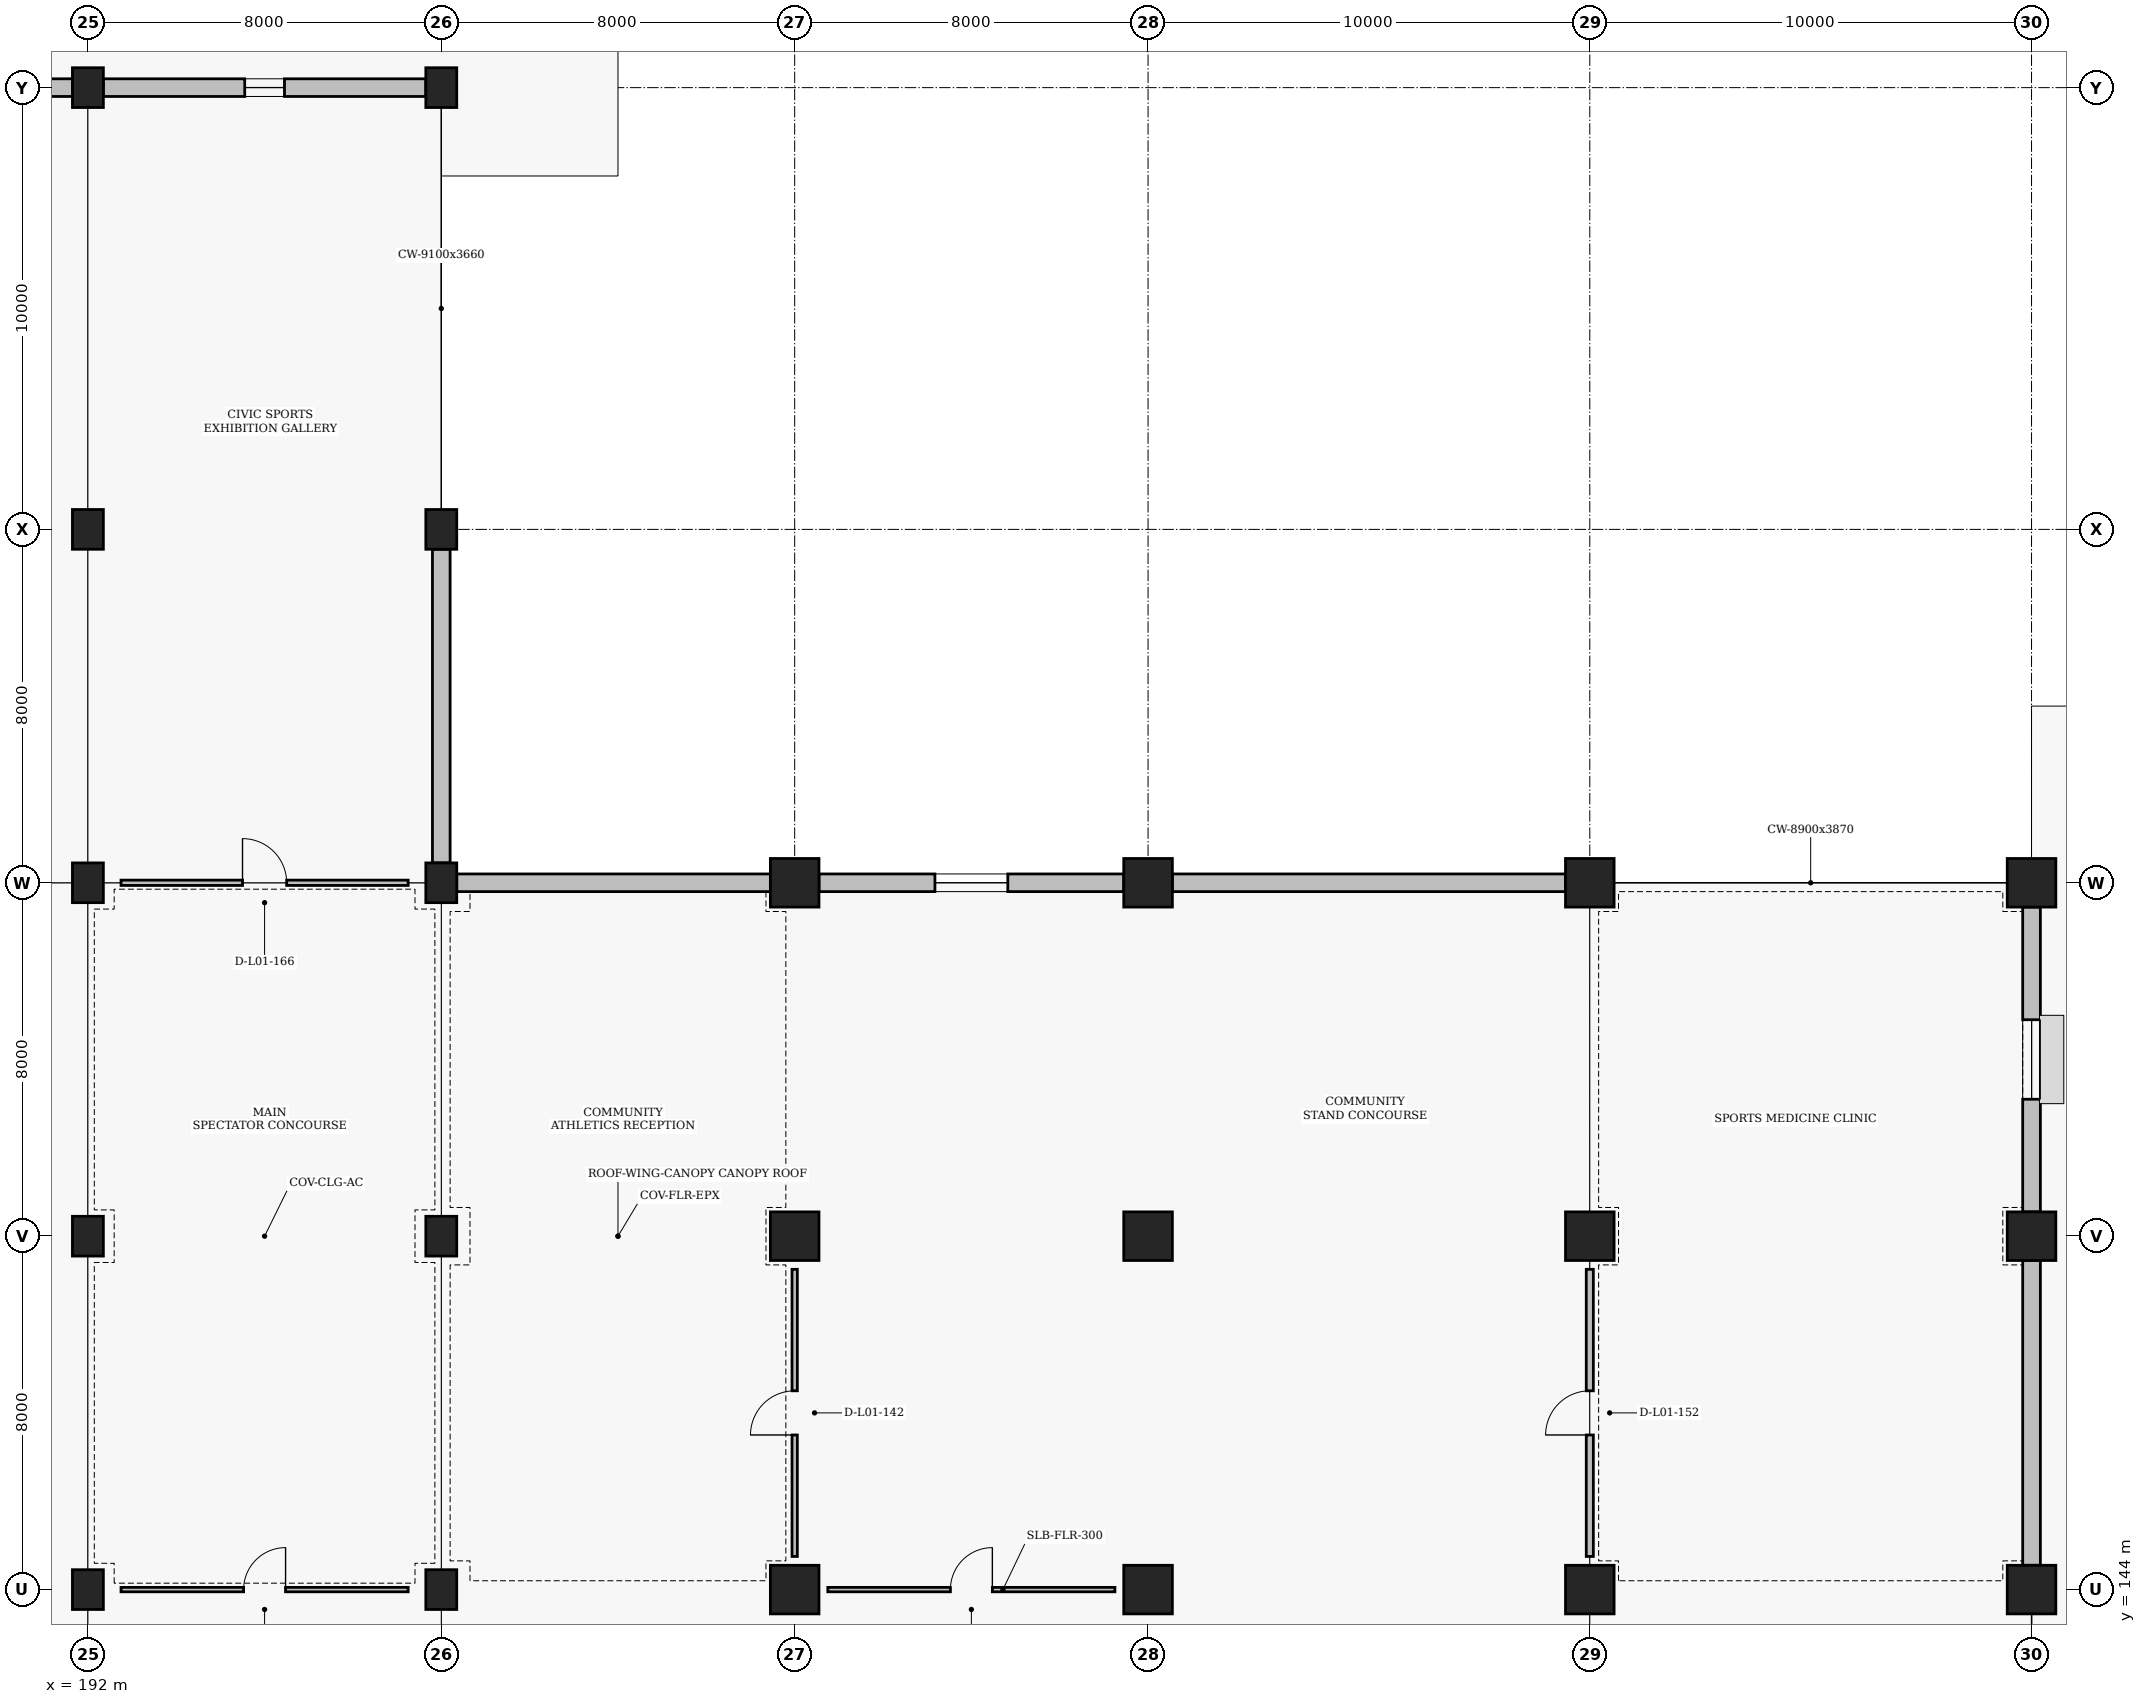
"""IFC4 building model, lengths in metres.
Left out: names, types, materials, properties, quantities, classifications, styles, units other than length and angle.
Written with IfcOpenShell. Run it as: python <this file> out.ifc"""

import sys

from ifc_helpers import new_model, si_unit, direction, frame, frame_2d, origin, origin_2d, place, context, subcontext, project, spatial, rectangle, extrude, element, fill, save


model = new_model("IFC4")
c1 = context("Model", 3, precision=1e-05, world=origin(), true_north=direction((0.0, 1.0)))
c2 = subcontext(c1, "Body", "Model", "MODEL_VIEW")
j1 = project(units=[si_unit("LENGTHUNIT", "METRE"), si_unit("PLANEANGLEUNIT", "RADIAN")], contexts=[c1])
p1 = place(None, origin())
s1 = spatial("IfcSite", under=j1, at=p1, CompositionType="ELEMENT")
p2 = place(p1, origin())
s2 = spatial("IfcBuilding", under=s1, at=p2, CompositionType="ELEMENT")
p3 = place(p2, origin())
s3 = spatial("IfcBuildingStorey", under=s2, at=p3, CompositionType="ELEMENT", Elevation=0.0)
for number, where, z_axis, x_axis in (
    (1, (192.0, 144.0, 0.0), (0.0, 0.0, 1.0), (1.0, 0.0, 0.0)),
    (2, (192.0, 152.0, 0.0), (0.0, 0.0, 1.0), (1.0, 0.0, 0.0)),
    (3, (192.0, 160.0, 0.0), (0.0, 0.0, 1.0), (1.0, 0.0, 0.0)),
    (4, (192.0, 168.0, 0.0), (0.0, 0.0, 1.0), (1.0, 0.0, 0.0)),
    (5, (192.0, 178.0, 0.0), (0.0, 0.0, 1.0), (1.0, 0.0, 0.0)),
    (6, (200.0, 144.0, 0.0), (0.0, 0.0, 1.0), (1.0, 0.0, 0.0)),
    (7, (200.0, 152.0, 0.0), (0.0, 0.0, 1.0), (1.0, 0.0, 0.0)),
    (8, (200.0, 160.0, 0.0), (0.0, 0.0, 1.0), (1.0, 0.0, 0.0)),
    (9, (200.0, 168.0, 0.0), (0.0, 0.0, 1.0), (1.0, 0.0, 0.0)),
    (10, (200.0, 178.0, 0.0), (0.0, 0.0, 1.0), (1.0, 0.0, 0.0)),
):
    element("IfcColumn", number, at=place(p3, frame(where, z_axis=z_axis, x_axis=x_axis)), inside=s3, PredefinedType="COLUMN", context=c2, shape_type="SweptSolid", body=[
        extrude(rectangle(XDim=0.7, YDim=0.9, at=origin_2d()), origin(), (0.0, 0.0, 1.0), 4.8),
    ])
for number, where, z_axis, x_axis in (
    (11, (208.0, 144.0, 0.0), (0.0, 0.0, 1.0), (1.0, 0.0, 0.0)),
    (12, (208.0, 152.0, 0.0), (0.0, 0.0, 1.0), (1.0, 0.0, 0.0)),
    (13, (208.0, 160.0, 0.0), (0.0, 0.0, 1.0), (1.0, 0.0, 0.0)),
    (14, (216.0, 144.0, 0.0), (0.0, 0.0, 1.0), (1.0, 0.0, 0.0)),
    (15, (216.0, 152.0, 0.0), (0.0, 0.0, 1.0), (1.0, 0.0, 0.0)),
    (16, (216.0, 160.0, 0.0), (0.0, 0.0, 1.0), (1.0, 0.0, 0.0)),
    (17, (226.0, 144.0, 0.0), (0.0, 0.0, 1.0), (1.0, 0.0, 0.0)),
    (18, (226.0, 152.0, 0.0), (0.0, 0.0, 1.0), (1.0, 0.0, 0.0)),
    (19, (226.0, 160.0, 0.0), (0.0, 0.0, 1.0), (1.0, 0.0, 0.0)),
    (20, (236.0, 144.0, 0.0), (0.0, 0.0, 1.0), (1.0, 0.0, 0.0)),
    (21, (236.0, 152.0, 0.0), (0.0, 0.0, 1.0), (1.0, 0.0, 0.0)),
    (22, (236.0, 160.0, 0.0), (0.0, 0.0, 1.0), (1.0, 0.0, 0.0)),
):
    element("IfcColumn", number, at=place(p3, frame(where, z_axis=z_axis, x_axis=x_axis)), inside=s3, PredefinedType="COLUMN", context=c2, shape_type="SweptSolid", body=[
        extrude(rectangle(XDim=1.1, YDim=1.1, at=origin_2d()), origin(), (0.0, 0.0, 1.0), 4.8),
    ])
p4 = place(p3, frame((184.35, 178.0, 0.0), z_axis=(0.0, 0.0, 1.0), x_axis=(1.0, 0.0, 0.0)))
e23 = element("IfcWall", 23, at=p4, inside=s3, PredefinedType="SOLIDWALL", context=c2, shape_type="SweptSolid", body=[
    extrude(rectangle(XDim=7.3, YDim=0.4, at=frame_2d((3.65, 0.0))), origin(), (0.0, 0.0, 1.0), 3.71),
])
p5 = place(p3, frame((200.0, 160.45, 0.0), z_axis=(0.0, 0.0, 1.0), x_axis=(0.0, 1.0, 0.0)))
e24 = element("IfcWall", 24, at=p5, inside=s3, PredefinedType="SOLIDWALL", context=c2, shape_type="SweptSolid", body=[
    extrude(rectangle(XDim=7.1, YDim=0.4, at=frame_2d((3.55, 0.0))), origin(), (0.0, 0.0, 1.0), 3.66),
])
p6 = place(p3, frame((192.35, 178.0, 0.0), z_axis=(0.0, 0.0, 1.0), x_axis=(1.0, 0.0, 0.0)))
e25 = element("IfcWall", 25, at=p6, inside=s3, PredefinedType="SOLIDWALL", context=c2, shape_type="SweptSolid", body=[
    extrude(rectangle(XDim=7.3, YDim=0.4, at=frame_2d((3.65, 0.0))), origin(), (0.0, 0.0, 1.0), 3.71),
])
p7 = place(p6, frame((3.2, 0.0, 0.95)))
e26 = element("IfcOpeningElement", 26, at=p7, cuts=e25, PredefinedType="OPENING", context=c2, shape_type="SweptSolid", body=[
    extrude(rectangle(XDim=0.9, YDim=1.5, at=frame_2d((0.45, 0.75))), frame((0.0, 0.21, 0.0), z_axis=(0.0, -1.0, 0.0), x_axis=(1.0, 0.0, 0.0)), (0.0, 0.0, 1.0), 0.42),
])
p8 = place(p3, frame((200.35, 160.0, 0.0), z_axis=(0.0, 0.0, 1.0), x_axis=(1.0, 0.0, 0.0)))
e27 = element("IfcWall", 27, at=p8, inside=s3, PredefinedType="SOLIDWALL", context=c2, shape_type="SweptSolid", body=[
    extrude(rectangle(XDim=7.1, YDim=0.4, at=frame_2d((3.55, 0.0))), origin(), (0.0, 0.0, 1.0), 3.81),
])
p9 = place(p3, frame((208.55, 160.0, 0.0), z_axis=(0.0, 0.0, 1.0), x_axis=(1.0, 0.0, 0.0)))
e28 = element("IfcWall", 28, at=p9, inside=s3, PredefinedType="SOLIDWALL", context=c2, shape_type="SweptSolid", body=[
    extrude(rectangle(XDim=6.9, YDim=0.4, at=frame_2d((3.45, 0.0))), origin(), (0.0, 0.0, 1.0), 3.87),
])
p10 = place(p9, frame((2.625, 0.0, 0.95)))
e29 = element("IfcOpeningElement", 29, at=p10, cuts=e28, PredefinedType="OPENING", context=c2, shape_type="SweptSolid", body=[
    extrude(rectangle(XDim=1.65, YDim=1.7, at=frame_2d((0.825, 0.85))), frame((0.0, 0.21, 0.0), z_axis=(0.0, -1.0, 0.0), x_axis=(1.0, 0.0, 0.0)), (0.0, 0.0, 1.0), 0.42),
])
p11 = place(p3, frame((216.55, 160.0, 0.0), z_axis=(0.0, 0.0, 1.0), x_axis=(1.0, 0.0, 0.0)))
e30 = element("IfcWall", 30, at=p11, inside=s3, PredefinedType="SOLIDWALL", context=c2, shape_type="SweptSolid", body=[
    extrude(rectangle(XDim=8.9, YDim=0.4, at=frame_2d((4.45, 0.0))), origin(), (0.0, 0.0, 1.0), 3.87),
])
p12 = place(p3, frame((236.0, 144.55, 0.0), z_axis=(0.0, 0.0, 1.0), x_axis=(0.0, 1.0, 0.0)))
e31 = element("IfcWall", 31, at=p12, inside=s3, PredefinedType="SOLIDWALL", context=c2, shape_type="SweptSolid", body=[
    extrude(rectangle(XDim=6.9, YDim=0.4, at=frame_2d((3.45, 0.0))), origin(), (0.0, 0.0, 1.0), 3.81),
])
p13 = place(p3, frame((236.0, 152.55, 0.0), z_axis=(0.0, 0.0, 1.0), x_axis=(0.0, 1.0, 0.0)))
e32 = element("IfcWall", 32, at=p13, inside=s3, PredefinedType="SOLIDWALL", context=c2, shape_type="SweptSolid", body=[
    extrude(rectangle(XDim=6.9, YDim=0.4, at=frame_2d((3.45, 0.0))), origin(), (0.0, 0.0, 1.0), 3.81),
])
p14 = place(p13, frame((2.55, 0.0, 0.95)))
e33 = element("IfcOpeningElement", 33, at=p14, cuts=e32, PredefinedType="OPENING", context=c2, shape_type="SweptSolid", body=[
    extrude(rectangle(XDim=1.8, YDim=1.8, at=frame_2d((0.9, 0.9))), frame((0.0, 0.21, 0.0), z_axis=(0.0, -1.0, 0.0), x_axis=(1.0, 0.0, 0.0)), (0.0, 0.0, 1.0), 0.42),
])
p15 = place(p3, frame((208.0, 144.75, 0.0), z_axis=(0.0, 0.0, 1.0), x_axis=(0.0, 1.0, 0.0)))
e34 = element("IfcWall", 34, at=p15, inside=s3, PredefinedType="PARTITIONING", context=c2, shape_type="SweptSolid", body=[
    extrude(rectangle(XDim=6.5, YDim=0.12, at=frame_2d((3.25, 0.0))), origin(), (0.0, 0.0, 1.0), 3.81),
])
p16 = place(p15, frame((2.75, 0.0, 0.0)))
e35 = element("IfcOpeningElement", 35, at=p16, cuts=e34, PredefinedType="OPENING", context=c2, shape_type="SweptSolid", body=[
    extrude(rectangle(XDim=1.0, YDim=2.1, at=frame_2d((0.5, 1.05))), frame((0.0, 0.07, 0.0), z_axis=(0.0, -1.0, 0.0), x_axis=(1.0, 0.0, 0.0)), (0.0, 0.0, 1.0), 0.14),
])
p17 = place(p3, frame((208.75, 144.0, 0.0), z_axis=(0.0, 0.0, 1.0), x_axis=(1.0, 0.0, 0.0)))
e36 = element("IfcWall", 36, at=p17, inside=s3, PredefinedType="PARTITIONING", context=c2, shape_type="SweptSolid", body=[
    extrude(rectangle(XDim=6.5, YDim=0.1, at=frame_2d((3.25, 0.0))), origin(), (0.0, 0.0, 1.0), 3.91),
])
p18 = place(p17, frame((2.775, 0.0, 0.0)))
e37 = element("IfcOpeningElement", 37, at=p18, cuts=e36, PredefinedType="OPENING", context=c2, shape_type="SweptSolid", body=[
    extrude(rectangle(XDim=0.95, YDim=2.1, at=frame_2d((0.475, 1.05))), frame((0.0, 0.06, 0.0), z_axis=(0.0, -1.0, 0.0), x_axis=(1.0, 0.0, 0.0)), (0.0, 0.0, 1.0), 0.12),
])
p19 = place(p3, frame((226.0, 144.75, 0.0), z_axis=(0.0, 0.0, 1.0), x_axis=(0.0, 1.0, 0.0)))
e38 = element("IfcWall", 38, at=p19, inside=s3, PredefinedType="PARTITIONING", context=c2, shape_type="SweptSolid", body=[
    extrude(rectangle(XDim=6.5, YDim=0.16, at=frame_2d((3.25, 0.0))), origin(), (0.0, 0.0, 1.0), 3.81),
])
p20 = place(p19, frame((2.75, 0.0, 0.0)))
e39 = element("IfcOpeningElement", 39, at=p20, cuts=e38, PredefinedType="OPENING", context=c2, shape_type="SweptSolid", body=[
    extrude(rectangle(XDim=1.0, YDim=2.1, at=frame_2d((0.5, 1.05))), frame((0.0, 0.09, 0.0), z_axis=(0.0, -1.0, 0.0), x_axis=(1.0, 0.0, 0.0)), (0.0, 0.0, 1.0), 0.18),
])
p21 = place(p3, frame((192.75, 144.0, 0.0), z_axis=(0.0, 0.0, 1.0), x_axis=(1.0, 0.0, 0.0)))
e40 = element("IfcWall", 40, at=p21, inside=s3, PredefinedType="PARTITIONING", context=c2, shape_type="SweptSolid", body=[
    extrude(rectangle(XDim=6.5, YDim=0.1, at=frame_2d((3.25, 0.0))), origin(), (0.0, 0.0, 1.0), 3.91),
])
p22 = place(p21, frame((2.775, 0.0, 0.0)))
e41 = element("IfcOpeningElement", 41, at=p22, cuts=e40, PredefinedType="OPENING", context=c2, shape_type="SweptSolid", body=[
    extrude(rectangle(XDim=0.95, YDim=2.1, at=frame_2d((0.475, 1.05))), frame((0.0, 0.06, 0.0), z_axis=(0.0, -1.0, 0.0), x_axis=(1.0, 0.0, 0.0)), (0.0, 0.0, 1.0), 0.12),
])
p23 = place(p3, frame((192.75, 160.0, 0.0), z_axis=(0.0, 0.0, 1.0), x_axis=(1.0, 0.0, 0.0)))
e42 = element("IfcWall", 42, at=p23, inside=s3, PredefinedType="PARTITIONING", context=c2, shape_type="SweptSolid", body=[
    extrude(rectangle(XDim=6.5, YDim=0.12, at=frame_2d((3.25, 0.0))), origin(), (0.0, 0.0, 1.0), 3.91),
])
p24 = place(p23, frame((2.75, 0.0, 0.0)))
e43 = element("IfcOpeningElement", 43, at=p24, cuts=e42, PredefinedType="OPENING", context=c2, shape_type="SweptSolid", body=[
    extrude(rectangle(XDim=1.0, YDim=2.1, at=frame_2d((0.5, 1.05))), frame((0.0, 0.07, 0.0), z_axis=(0.0, -1.0, 0.0), x_axis=(1.0, 0.0, 0.0)), (0.0, 0.0, 1.0), 0.14),
])
p25 = place(p7, origin())
e44 = element("IfcWindow", 44, at=p25, inside=s3, PartitioningType="SINGLE_PANEL", PredefinedType="WINDOW", context=c2, shape_type="SweptSolid", body=[
    extrude(rectangle(XDim=0.9, YDim=1.5, at=frame_2d((0.45, 0.75))), frame((0.0, 0.03, 0.0), z_axis=(0.0, -1.0, 0.0), x_axis=(1.0, 0.0, 0.0)), (0.0, 0.0, 1.0), 0.06),
])
fill(e26, e44)
p26 = place(p10, origin())
e45 = element("IfcWindow", 45, at=p26, inside=s3, PartitioningType="SINGLE_PANEL", PredefinedType="WINDOW", context=c2, shape_type="SweptSolid", body=[
    extrude(rectangle(XDim=1.65, YDim=1.7, at=frame_2d((0.825, 0.85))), frame((0.0, 0.03, 0.0), z_axis=(0.0, -1.0, 0.0), x_axis=(1.0, 0.0, 0.0)), (0.0, 0.0, 1.0), 0.06),
])
fill(e29, e45)
p27 = place(p14, origin())
e46 = element("IfcWindow", 46, at=p27, inside=s3, PartitioningType="SINGLE_PANEL", PredefinedType="WINDOW", context=c2, shape_type="SweptSolid", body=[
    extrude(rectangle(XDim=1.8, YDim=1.8, at=frame_2d((0.9, 0.9))), frame((0.0, 0.03, 0.0), z_axis=(0.0, -1.0, 0.0), x_axis=(1.0, 0.0, 0.0)), (0.0, 0.0, 1.0), 0.06),
])
fill(e33, e46)
p28 = place(p16, origin())
e47 = element("IfcDoor", 47, at=p28, inside=s3, OperationType="SINGLE_SWING_LEFT", PredefinedType="DOOR", context=c2, shape_type="SweptSolid", body=[
    extrude(rectangle(XDim=1.0, YDim=2.1, at=frame_2d((0.5, 1.05))), frame((0.0, 0.025, 0.0), z_axis=(0.0, -1.0, 0.0), x_axis=(1.0, 0.0, 0.0)), (0.0, 0.0, 1.0), 0.05),
])
fill(e35, e47)
p29 = place(p18, origin())
e48 = element("IfcDoor", 48, at=p29, inside=s3, OperationType="SINGLE_SWING_RIGHT", PredefinedType="DOOR", context=c2, shape_type="SweptSolid", body=[
    extrude(rectangle(XDim=0.95, YDim=2.1, at=frame_2d((0.475, 1.05))), frame((0.0, 0.025, 0.0), z_axis=(0.0, -1.0, 0.0), x_axis=(1.0, 0.0, 0.0)), (0.0, 0.0, 1.0), 0.05),
])
fill(e37, e48)
p30 = place(p20, origin())
e49 = element("IfcDoor", 49, at=p30, inside=s3, OperationType="SINGLE_SWING_LEFT", PredefinedType="DOOR", context=c2, shape_type="SweptSolid", body=[
    extrude(rectangle(XDim=1.0, YDim=2.1, at=frame_2d((0.5, 1.05))), frame((0.0, 0.025, 0.0), z_axis=(0.0, -1.0, 0.0), x_axis=(1.0, 0.0, 0.0)), (0.0, 0.0, 1.0), 0.05),
])
fill(e39, e49)
p31 = place(p22, origin())
e50 = element("IfcDoor", 50, at=p31, inside=s3, OperationType="SINGLE_SWING_RIGHT", PredefinedType="DOOR", context=c2, shape_type="SweptSolid", body=[
    extrude(rectangle(XDim=0.95, YDim=2.1, at=frame_2d((0.475, 1.05))), frame((0.0, 0.025, 0.0), z_axis=(0.0, -1.0, 0.0), x_axis=(1.0, 0.0, 0.0)), (0.0, 0.0, 1.0), 0.05),
])
fill(e41, e50)
p32 = place(p24, origin())
e51 = element("IfcDoor", 51, at=p32, inside=s3, OperationType="SINGLE_SWING_LEFT", PredefinedType="DOOR", context=c2, shape_type="SweptSolid", body=[
    extrude(rectangle(XDim=1.0, YDim=2.1, at=frame_2d((0.5, 1.05))), frame((0.0, 0.025, 0.0), z_axis=(0.0, -1.0, 0.0), x_axis=(1.0, 0.0, 0.0)), (0.0, 0.0, 1.0), 0.05),
])
fill(e43, e51)
save(model, sys.argv[1])
